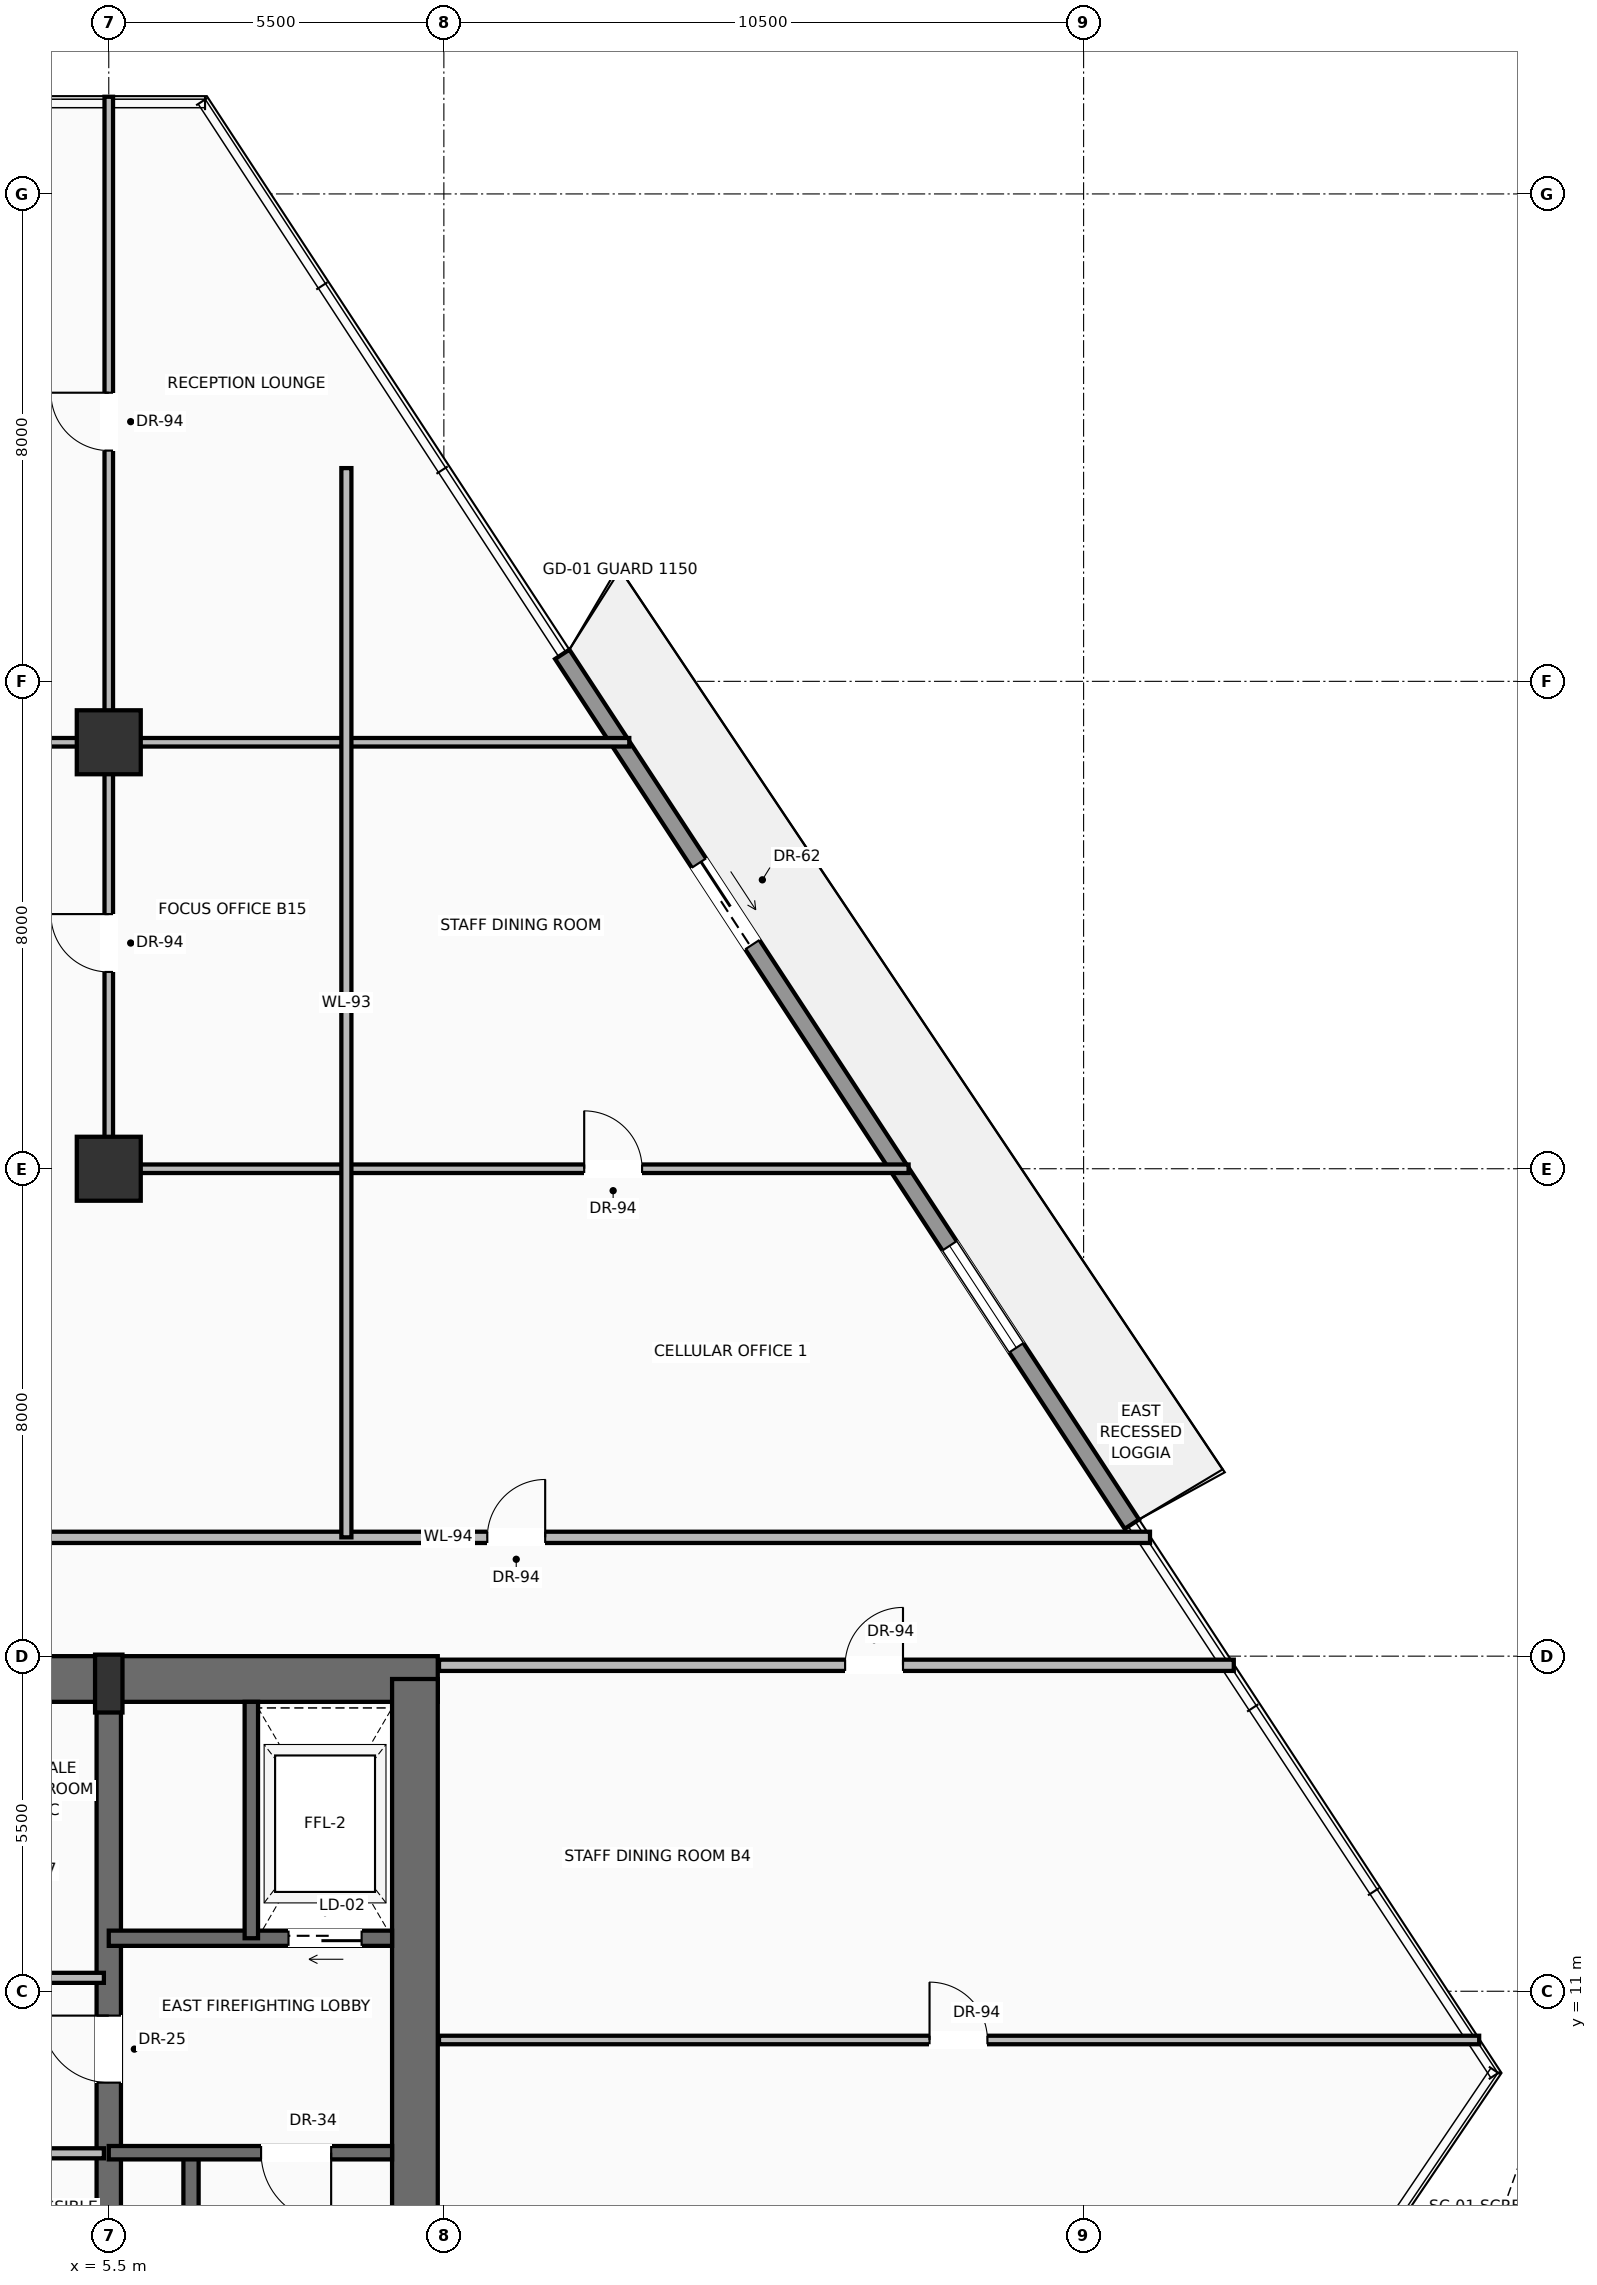
"""IFC4 building model, lengths in metres.
Left out: names, types, materials, properties, quantities, classifications, styles, units other than length and angle.
Written with IfcOpenShell. Run it as: python <this file> out.ifc"""

import sys

from ifc_helpers import new_model, si_unit, direction, frame, frame_2d, origin, origin_2d, place, context, subcontext, project, spatial, rectangle, extrude, source, transform, mapped, element, fill, save


model = new_model("IFC4")
c1 = context("Model", 3, precision=1e-05, world=origin(), true_north=direction((0.0, 1.0)))
c2 = subcontext(c1, "Body", "Model", "MODEL_VIEW")
j1 = project(units=[si_unit("LENGTHUNIT", "METRE"), si_unit("PLANEANGLEUNIT", "RADIAN")], contexts=[c1])
p1 = place(None, origin())
s1 = spatial("IfcSite", under=j1, at=p1, CompositionType="ELEMENT")
p2 = place(p1, origin())
s2 = spatial("IfcBuilding", under=s1, at=p2, CompositionType="ELEMENT")
p3 = place(p2, frame((0.0, 0.0, 76.6)))
s3 = spatial("IfcBuildingStorey", under=s2, at=p3, CompositionType="ELEMENT", Elevation=76.6)
p4 = place(p3, frame((-10.9, 16.125, 0.0), z_axis=(0.0, 0.0, 1.0), x_axis=(1.0, 0.0, 0.0)))
e1 = element("IfcWall", 1, at=p4, inside=s3, PredefinedType="SHEAR", context=c2, shape_type="SweptSolid", body=[
    extrude(rectangle(XDim=21.8, YDim=0.75, at=frame_2d((10.9, 0.0))), origin(), (0.0, 0.0, 1.0), 3.45),
])
p5 = place(p4, frame((3.47, 0.0, 0.0)))
e2 = element("IfcOpeningElement", 2, at=p5, cuts=e1, PredefinedType="OPENING", context=c2, shape_type="SweptSolid", body=[
    extrude(rectangle(XDim=1.3, YDim=2.3, at=frame_2d((0.65, 1.15))), frame((0.0, 0.385, 0.0), z_axis=(0.0, -1.0, 0.0), x_axis=(1.0, 0.0, 0.0)), (0.0, 0.0, 1.0), 0.77),
])
p6 = place(p4, frame((9.9, 0.0, 0.0)))
e3 = element("IfcOpeningElement", 3, at=p6, cuts=e1, PredefinedType="OPENING", context=c2, shape_type="SweptSolid", body=[
    extrude(rectangle(XDim=2.0, YDim=2.4, at=frame_2d((1.0, 1.2))), frame((0.0, 0.385, 0.0), z_axis=(0.0, -1.0, 0.0), x_axis=(1.0, 0.0, 0.0)), (0.0, 0.0, 1.0), 0.77),
])
p7 = place(p3, frame((10.525, 0.475, 0.0), z_axis=(0.0, 0.0, 1.0), x_axis=(0.0, 1.0, 0.0)))
e4 = element("IfcWall", 4, at=p7, inside=s3, PredefinedType="SHEAR", context=c2, shape_type="SweptSolid", body=[
    extrude(rectangle(XDim=15.65, YDim=0.75, at=frame_2d((7.825, 0.0))), origin(), (0.0, 0.0, 1.0), 3.45),
])
p8 = place(p3, frame((5.5, 0.475, 0.0), z_axis=(0.0, 0.0, 1.0), x_axis=(0.0, 1.0, 0.0)))
e5 = element("IfcWall", 5, at=p8, inside=s3, PredefinedType="SHEAR", context=c2, shape_type="SweptSolid", body=[
    extrude(rectangle(XDim=15.65, YDim=0.4, at=frame_2d((7.825, 0.0))), origin(), (0.0, 0.0, 1.0), 3.45),
])
p9 = place(p8, frame((9.025, 0.0, 0.0)))
e6 = element("IfcOpeningElement", 6, at=p9, cuts=e5, PredefinedType="OPENING", context=c2, shape_type="SweptSolid", body=[
    extrude(rectangle(XDim=1.1, YDim=2.2, at=frame_2d((0.55, 1.1))), frame((0.0, 0.21, 0.0), z_axis=(0.0, -1.0, 0.0), x_axis=(1.0, 0.0, 0.0)), (0.0, 0.0, 1.0), 0.42),
])
m1 = source(origin(), c2, "Body", "SweptSolid", [
    extrude(rectangle(XDim=0.45, YDim=0.95, at=origin_2d()), origin(), (0.0, 0.0, 1.0), 3.7),
])
p10 = place(p3, frame((5.5, 16.05, 0.0), z_axis=(0.0, 0.0, 1.0), x_axis=(1.0, 0.0, 0.0)))
e7 = element("IfcColumn", 7, at=p10, inside=s3, PredefinedType="PILASTER", context=c2, shape_type="MappedRepresentation", body=[
    mapped(m1, transform((0.0, 0.0, 0.0), scale=1.0)),
])
m2 = source(origin(), c2, "Body", "SweptSolid", [
    extrude(rectangle(XDim=1.05, YDim=1.05, at=origin_2d()), origin(), (0.0, 0.0, 1.0), 3.7),
])
for number, where, z_axis, x_axis in (
    (8, (5.5, 24.5, 0.0), (0.0, 0.0, 1.0), (1.0, 0.0, 0.0)),
    (9, (5.5, 31.5, 0.0), (0.0, 0.0, 1.0), (1.0, 0.0, 0.0)),
):
    element("IfcColumn", number, at=place(p3, frame(where, z_axis=z_axis, x_axis=x_axis)), inside=s3, PredefinedType="COLUMN", context=c2, shape_type="MappedRepresentation", body=[
        mapped(m2, transform((0.0, 0.0, 0.0), scale=1.0)),
    ])
p11 = place(p3, frame((12.943, 32.943, 0.0), z_axis=(0.0, 0.0, 1.0), x_axis=(0.547860918782, -0.836569431471, 0.0)))
e10 = element("IfcWall", 10, at=p11, inside=s3, PredefinedType="SOLIDWALL", context=c2, shape_type="SweptSolid", body=[
    extrude(rectangle(XDim=17.066, YDim=0.28, at=frame_2d((8.533, 0.0))), origin(), (0.0, 0.0, 1.0), 3.03),
])
p12 = place(p11, frame((4.096, 0.0, 0.0)))
e11 = element("IfcOpeningElement", 11, at=p12, cuts=e10, PredefinedType="OPENING", context=c2, shape_type="SweptSolid", body=[
    extrude(rectangle(XDim=1.6, YDim=2.35, at=frame_2d((0.8, 1.175))), frame((0.0, 0.15, 0.0), z_axis=(0.0, -1.0, 0.0), x_axis=(1.0, 0.0, 0.0)), (0.0, 0.0, 1.0), 0.3),
])
p13 = place(p11, frame((11.604, 0.0, 0.9)))
e12 = element("IfcOpeningElement", 12, at=p13, cuts=e10, PredefinedType="OPENING", context=c2, shape_type="SweptSolid", body=[
    extrude(rectangle(XDim=2.0, YDim=1.85, at=frame_2d((1.0, 0.925))), frame((0.0, 0.15, 0.0), z_axis=(0.0, -1.0, 0.0), x_axis=(1.0, 0.0, 0.0)), (0.0, 0.0, 1.0), 0.3),
])
p14 = place(p3, frame((6.85, 0.85, 0.0), z_axis=(0.0, 0.0, 1.0), x_axis=(0.0, 1.0, 0.0)))
e13 = element("IfcWall", 13, at=p14, inside=s3, PredefinedType="SOLIDWALL", context=c2, shape_type="SweptSolid", body=[
    extrude(rectangle(XDim=7.5, YDim=0.25, at=frame_2d((3.75, 0.0))), origin(), (0.0, 0.0, 1.0), 3.45),
])
p15 = place(p3, frame((10.15, 8.35, 0.0), z_axis=(0.0, 0.0, 1.0), x_axis=(-1.0, 0.0, 0.0)))
e14 = element("IfcWall", 14, at=p15, inside=s3, PredefinedType="SOLIDWALL", context=c2, shape_type="SweptSolid", body=[
    extrude(rectangle(XDim=4.65, YDim=0.22, at=frame_2d((2.325, 0.0))), origin(), (0.0, 0.0, 1.0), 3.45),
])
p16 = place(p15, frame((1.0, 0.0, 0.0)))
e15 = element("IfcOpeningElement", 15, at=p16, cuts=e14, PredefinedType="OPENING", context=c2, shape_type="SweptSolid", body=[
    extrude(rectangle(XDim=1.15, YDim=2.2, at=frame_2d((0.575, 1.1))), frame((0.0, 0.12, 0.0), z_axis=(0.0, -1.0, 0.0), x_axis=(1.0, 0.0, 0.0)), (0.0, 0.0, 1.0), 0.24),
])
p17 = place(p3, frame((10.15, 11.87, 0.0), z_axis=(0.0, 0.0, 1.0), x_axis=(-1.0, 0.0, 0.0)))
e16 = element("IfcWall", 16, at=p17, inside=s3, PredefinedType="SOLIDWALL", context=c2, shape_type="SweptSolid", body=[
    extrude(rectangle(XDim=4.65, YDim=0.25, at=frame_2d((2.325, 0.0))), origin(), (0.0, 0.0, 1.0), 3.45),
])
p18 = place(p17, frame((0.5, 0.0, 0.0)))
e17 = element("IfcOpeningElement", 17, at=p18, cuts=e16, PredefinedType="OPENING", context=c2, shape_type="SweptSolid", body=[
    extrude(rectangle(XDim=1.2, YDim=2.25, at=frame_2d((0.6, 1.125))), frame((0.0, 0.135, 0.0), z_axis=(0.0, -1.0, 0.0), x_axis=(1.0, 0.0, 0.0)), (0.0, 0.0, 1.0), 0.27),
])
p19 = place(p3, frame((7.84, 11.87, 0.0), z_axis=(0.0, 0.0, 1.0), x_axis=(0.0, 1.0, 0.0)))
e18 = element("IfcWall", 18, at=p19, inside=s3, PredefinedType="SOLIDWALL", context=c2, shape_type="SweptSolid", body=[
    extrude(rectangle(XDim=3.88, YDim=0.22, at=frame_2d((1.94, 0.0))), origin(), (0.0, 0.0, 1.0), 3.45),
])
for number, where, z_axis, x_axis in (
    (19, (3.54, 8.34, 0.0), (0.0, 0.0, 1.0), (1.0, 0.0, 0.0)),
    (20, (3.54, 11.22, 0.0), (0.0, 0.0, 1.0), (1.0, 0.0, 0.0)),
):
    element("IfcWall", number, at=place(p3, frame(where, z_axis=z_axis, x_axis=x_axis)), inside=s3, PredefinedType="PARTITIONING", context=c2, shape_type="SweptSolid", body=[
        extrude(rectangle(XDim=1.88, YDim=0.165, at=frame_2d((0.94, 0.0))), origin(), (0.0, 0.0, 1.0), 3.442),
    ])
p20 = place(p3, frame((10.92, 16.35, 0.0), z_axis=(0.0, 0.0, 1.0), x_axis=(1.0, 0.0, 0.0)))
e21 = element("IfcWall", 21, at=p20, inside=s3, PredefinedType="PARTITIONING", context=c2, shape_type="SweptSolid", body=[
    extrude(rectangle(XDim=13.045, YDim=0.185, at=frame_2d((6.522, 0.0))), origin(), (0.0, 0.0, 1.0), 2.747),
])
p21 = place(p20, frame((6.666, 0.0, 0.0)))
e22 = element("IfcOpeningElement", 22, at=p21, cuts=e21, PredefinedType="OPENING", context=c2, shape_type="SweptSolid", body=[
    extrude(rectangle(XDim=0.95, YDim=2.2, at=frame_2d((0.475, 1.1))), frame((0.0, 0.103, 0.0), z_axis=(0.0, -1.0, 0.0), x_axis=(1.0, 0.0, 0.0)), (0.0, 0.0, 1.0), 0.205),
])
p22 = place(p3, frame((-0.45, 18.45, 0.0), z_axis=(0.0, 0.0, 1.0), x_axis=(1.0, 0.0, 0.0)))
e23 = element("IfcWall", 23, at=p22, inside=s3, PredefinedType="PARTITIONING", context=c2, shape_type="SweptSolid", body=[
    extrude(rectangle(XDim=23.04, YDim=0.185, at=frame_2d((11.52, 0.0))), origin(), (0.0, 0.0, 1.0), 2.747),
])
p23 = place(p22, frame((12.163, 0.0, 0.0)))
e24 = element("IfcOpeningElement", 24, at=p23, cuts=e23, PredefinedType="OPENING", context=c2, shape_type="SweptSolid", body=[
    extrude(rectangle(XDim=0.95, YDim=2.2, at=frame_2d((0.475, 1.1))), frame((0.0, 0.103, 0.0), z_axis=(0.0, -1.0, 0.0), x_axis=(1.0, 0.0, 0.0)), (0.0, 0.0, 1.0), 0.205),
])
p24 = place(p3, frame((5.5, 24.5, 0.0), z_axis=(0.0, 0.0, 1.0), x_axis=(0.0, 1.0, 0.0)))
e25 = element("IfcWall", 25, at=p24, inside=s3, PredefinedType="PARTITIONING", context=c2, shape_type="SweptSolid", body=[
    extrude(rectangle(XDim=17.595, YDim=0.14, at=frame_2d((8.798, 0.0))), origin(), (0.0, 0.0, 1.0), 2.747),
])
p25 = place(p24, frame((3.23, 0.0, 0.0)))
e26 = element("IfcOpeningElement", 26, at=p25, cuts=e25, PredefinedType="OPENING", context=c2, shape_type="SweptSolid", body=[
    extrude(rectangle(XDim=0.95, YDim=2.2, at=frame_2d((0.475, 1.1))), frame((0.0, 0.08, 0.0), z_axis=(0.0, -1.0, 0.0), x_axis=(1.0, 0.0, 0.0)), (0.0, 0.0, 1.0), 0.16),
])
p26 = place(p24, frame((11.787, 0.0, 0.0)))
e27 = element("IfcOpeningElement", 27, at=p26, cuts=e25, PredefinedType="OPENING", context=c2, shape_type="SweptSolid", body=[
    extrude(rectangle(XDim=0.95, YDim=2.2, at=frame_2d((0.475, 1.1))), frame((0.0, 0.08, 0.0), z_axis=(0.0, -1.0, 0.0), x_axis=(1.0, 0.0, 0.0)), (0.0, 0.0, 1.0), 0.16),
])
p27 = place(p3, frame((5.5, 24.5, 0.0), z_axis=(0.0, 0.0, 1.0), x_axis=(1.0, 0.0, 0.0)))
e28 = element("IfcWall", 28, at=p27, inside=s3, PredefinedType="PARTITIONING", context=c2, shape_type="SweptSolid", body=[
    extrude(rectangle(XDim=13.128, YDim=0.14, at=frame_2d((6.564, 0.0))), origin(), (0.0, 0.0, 1.0), 2.747),
])
p28 = place(p27, frame((7.803, 0.0, 0.0)))
e29 = element("IfcOpeningElement", 29, at=p28, cuts=e28, PredefinedType="OPENING", context=c2, shape_type="SweptSolid", body=[
    extrude(rectangle(XDim=0.95, YDim=2.2, at=frame_2d((0.475, 1.1))), frame((0.0, 0.08, 0.0), z_axis=(0.0, -1.0, 0.0), x_axis=(1.0, 0.0, 0.0)), (0.0, 0.0, 1.0), 0.16),
])
p29 = place(p3, frame((-0.45, 31.5, 0.0), z_axis=(0.0, 0.0, 1.0), x_axis=(1.0, 0.0, 0.0)))
e30 = element("IfcWall", 30, at=p29, inside=s3, PredefinedType="PARTITIONING", context=c2, shape_type="SweptSolid", body=[
    extrude(rectangle(XDim=14.493, YDim=0.14, at=frame_2d((7.247, 0.0))), origin(), (0.0, 0.0, 1.0), 2.747),
])
p30 = place(p3, frame((9.4, 18.45, 0.0), z_axis=(0.0, 0.0, 1.0), x_axis=(0.0, 1.0, 0.0)))
e31 = element("IfcWall", 31, at=p30, inside=s3, PredefinedType="PARTITIONING", context=c2, shape_type="SweptSolid", body=[
    extrude(rectangle(XDim=17.55, YDim=0.165, at=frame_2d((8.775, 0.0))), origin(), (0.0, 0.0, 1.0), 2.747),
])
p31 = place(p3, frame((10.92, 10.2, 0.0), z_axis=(0.0, 0.0, 1.0), x_axis=(1.0, 0.0, 0.0)))
e32 = element("IfcWall", 32, at=p31, inside=s3, PredefinedType="PARTITIONING", context=c2, shape_type="SweptSolid", body=[
    extrude(rectangle(XDim=17.073, YDim=0.14, at=frame_2d((8.536, 0.0))), origin(), (0.0, 0.0, 1.0), 3.442),
])
p32 = place(p31, frame((8.051, 0.0, 0.0)))
e33 = element("IfcOpeningElement", 33, at=p32, cuts=e32, PredefinedType="OPENING", context=c2, shape_type="SweptSolid", body=[
    extrude(rectangle(XDim=0.95, YDim=2.2, at=frame_2d((0.475, 1.1))), frame((0.0, 0.08, 0.0), z_axis=(0.0, -1.0, 0.0), x_axis=(1.0, 0.0, 0.0)), (0.0, 0.0, 1.0), 0.16),
])
m3 = source(origin(), c2, "Body", "SweptSolid", [
    extrude(rectangle(XDim=1.6, YDim=2.35, at=frame_2d((0.8, 1.175))), frame((0.0, 0.025, 0.0), z_axis=(0.0, -1.0, 0.0), x_axis=(1.0, 0.0, 0.0)), (0.0, 0.0, 1.0), 0.05),
])
p33 = place(p12, origin())
e34 = element("IfcDoor", 34, at=p33, inside=s3, OperationType="SLIDING_TO_RIGHT", PredefinedType="DOOR", context=c2, shape_type="MappedRepresentation", body=[
    mapped(m3, transform((0.0, 0.0, 0.0), scale=1.0)),
])
fill(e11, e34)
m4 = source(origin(), c2, "Body", "SweptSolid", [
    extrude(rectangle(XDim=2.0, YDim=1.85, at=frame_2d((1.0, 0.925))), frame((0.0, 0.03, 0.0), z_axis=(0.0, -1.0, 0.0), x_axis=(1.0, 0.0, 0.0)), (0.0, 0.0, 1.0), 0.06),
])
p34 = place(p13, origin())
e35 = element("IfcWindow", 35, at=p34, inside=s3, PartitioningType="SINGLE_PANEL", PredefinedType="WINDOW", context=c2, shape_type="MappedRepresentation", body=[
    mapped(m4, transform((0.0, 0.0, 0.0), scale=1.0)),
])
fill(e12, e35)
m5 = source(origin(), c2, "Body", "SweptSolid", [
    extrude(rectangle(XDim=1.15, YDim=2.2, at=frame_2d((0.575, 1.1))), frame((0.0, 0.025, 0.0), z_axis=(0.0, -1.0, 0.0), x_axis=(1.0, 0.0, 0.0)), (0.0, 0.0, 1.0), 0.05),
])
p35 = place(p16, origin())
e36 = element("IfcDoor", 36, at=p35, inside=s3, OperationType="SINGLE_SWING_LEFT", PredefinedType="DOOR", context=c2, shape_type="MappedRepresentation", body=[
    mapped(m5, transform((0.0, 0.0, 0.0), scale=1.0)),
])
fill(e15, e36)
m6 = source(origin(), c2, "Body", "SweptSolid", [
    extrude(rectangle(XDim=1.1, YDim=2.2, at=frame_2d((0.55, 1.1))), frame((0.0, 0.025, 0.0), z_axis=(0.0, -1.0, 0.0), x_axis=(1.0, 0.0, 0.0)), (0.0, 0.0, 1.0), 0.05),
])
p36 = place(p9, origin())
e37 = element("IfcDoor", 37, at=p36, inside=s3, OperationType="SINGLE_SWING_RIGHT", PredefinedType="DOOR", context=c2, shape_type="MappedRepresentation", body=[
    mapped(m6, transform((0.0, 0.0, 0.0), scale=1.0)),
])
fill(e6, e37)
m7 = source(origin(), c2, "Body", "SweptSolid", [
    extrude(rectangle(XDim=1.2, YDim=2.25, at=frame_2d((0.6, 1.125))), frame((0.0, 0.025, 0.0), z_axis=(0.0, -1.0, 0.0), x_axis=(1.0, 0.0, 0.0)), (0.0, 0.0, 1.0), 0.05),
])
p37 = place(p18, origin())
e38 = element("IfcDoor", 38, at=p37, inside=s3, OperationType="SLIDING_TO_RIGHT", PredefinedType="DOOR", context=c2, shape_type="MappedRepresentation", body=[
    mapped(m7, transform((0.0, 0.0, 0.0), scale=1.0)),
])
fill(e17, e38)
m8 = source(origin(), c2, "Body", "SweptSolid", [
    extrude(rectangle(XDim=0.95, YDim=2.2, at=frame_2d((0.475, 1.1))), frame((0.0, 0.025, 0.0), z_axis=(0.0, -1.0, 0.0), x_axis=(1.0, 0.0, 0.0)), (0.0, 0.0, 1.0), 0.05),
])
p38 = place(p21, origin())
e39 = element("IfcDoor", 39, at=p38, inside=s3, OperationType="SINGLE_SWING_RIGHT", PredefinedType="DOOR", context=c2, shape_type="MappedRepresentation", body=[
    mapped(m8, transform((0.0, 0.0, 0.0), scale=1.0)),
])
fill(e22, e39)
p39 = place(p23, origin())
e40 = element("IfcDoor", 40, at=p39, inside=s3, OperationType="SINGLE_SWING_RIGHT", PredefinedType="DOOR", context=c2, shape_type="MappedRepresentation", body=[
    mapped(m8, transform((0.0, 0.0, 0.0), scale=1.0)),
])
fill(e24, e40)
p40 = place(p32, origin())
e41 = element("IfcDoor", 41, at=p40, inside=s3, OperationType="SINGLE_SWING_LEFT", PredefinedType="DOOR", context=c2, shape_type="MappedRepresentation", body=[
    mapped(m8, transform((0.0, 0.0, 0.0), scale=1.0)),
])
fill(e33, e41)
p41 = place(p28, origin())
e42 = element("IfcDoor", 42, at=p41, inside=s3, OperationType="SINGLE_SWING_LEFT", PredefinedType="DOOR", context=c2, shape_type="MappedRepresentation", body=[
    mapped(m8, transform((0.0, 0.0, 0.0), scale=1.0)),
])
fill(e29, e42)
p42 = place(p25, origin())
e43 = element("IfcDoor", 43, at=p42, inside=s3, OperationType="SINGLE_SWING_RIGHT", PredefinedType="DOOR", context=c2, shape_type="MappedRepresentation", body=[
    mapped(m8, transform((0.0, 0.0, 0.0), scale=1.0)),
])
fill(e26, e43)
p43 = place(p26, origin())
e44 = element("IfcDoor", 44, at=p43, inside=s3, OperationType="SINGLE_SWING_RIGHT", PredefinedType="DOOR", context=c2, shape_type="MappedRepresentation", body=[
    mapped(m8, transform((0.0, 0.0, 0.0), scale=1.0)),
])
fill(e27, e44)
save(model, sys.argv[1])
